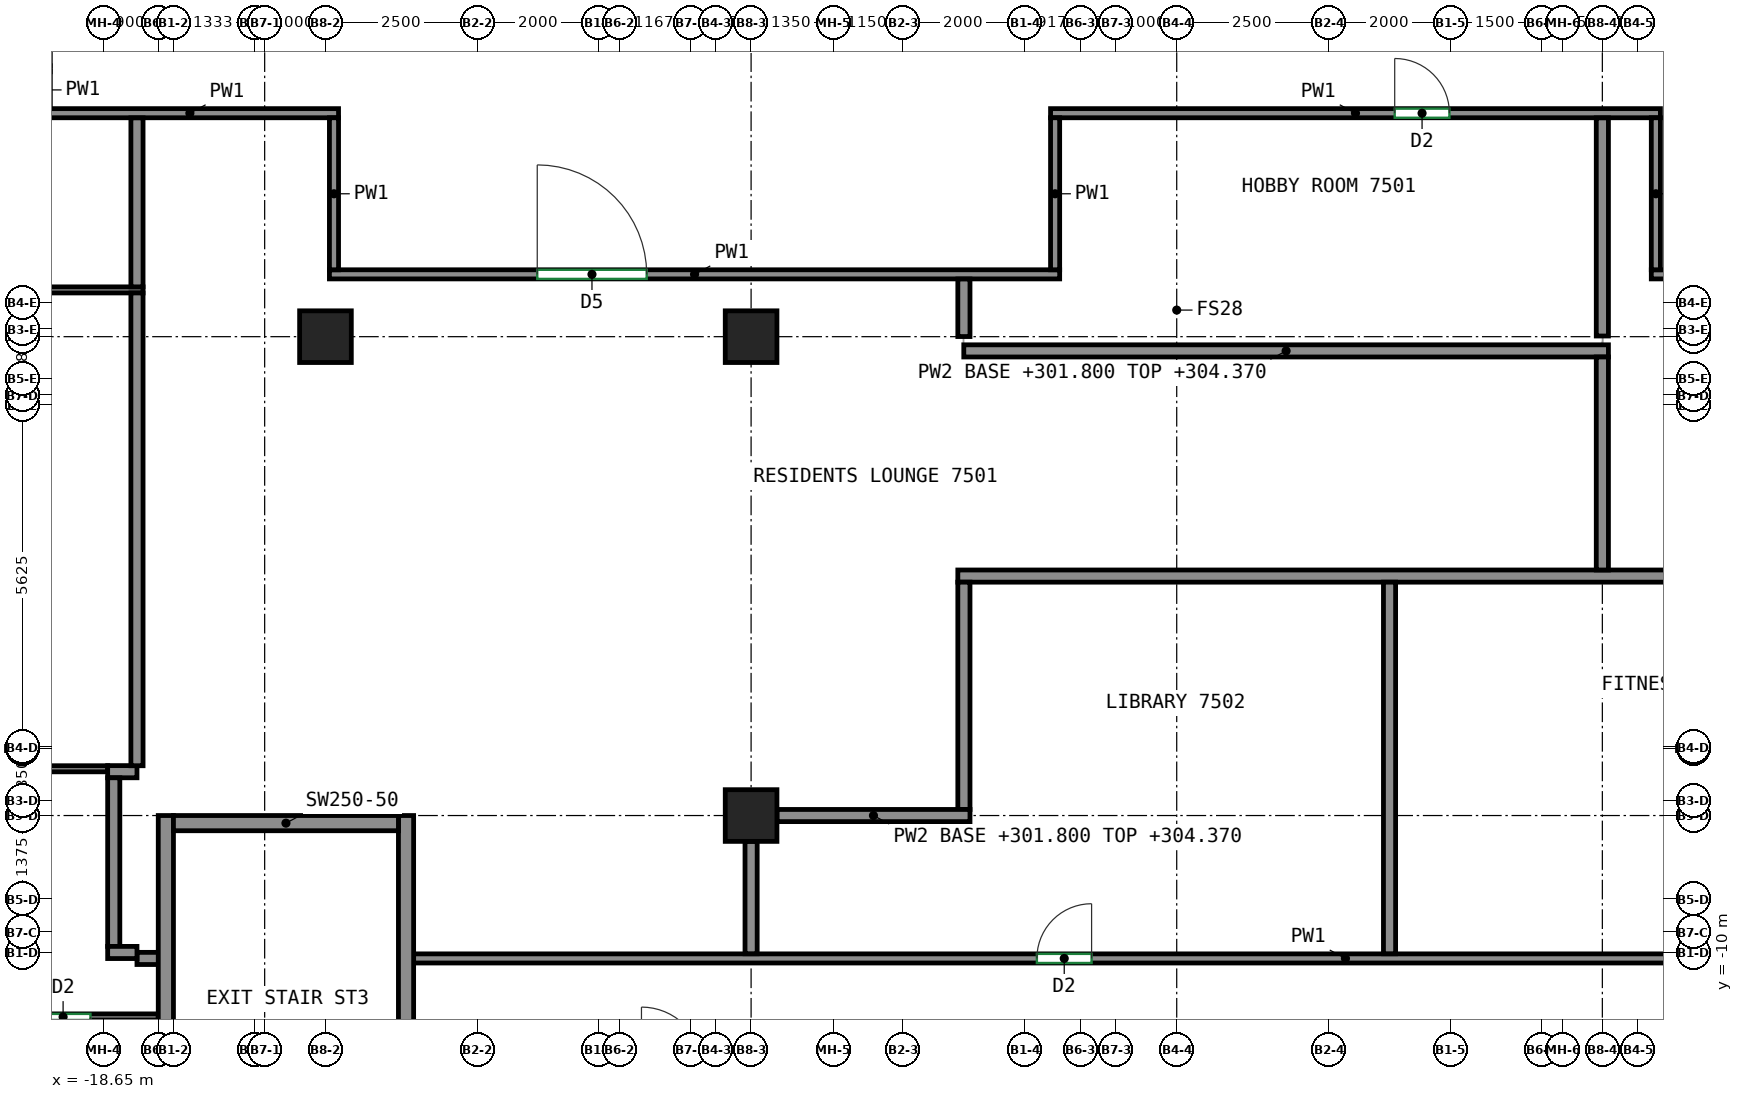
"""IFC4 building model, lengths in metres.
Left out: names, types, materials, properties, quantities, classifications, styles, units other than length and angle.
Written with IfcOpenShell. Run it as: python <this file> out.ifc"""

import sys

from ifc_helpers import new_model, si_unit, direction, frame, frame_2d, origin, origin_2d, place, context, subcontext, project, spatial, rectangle, extrude, source, transform, mapped, element, fill, save


model = new_model("IFC4")
c1 = context("Model", 3, precision=1e-05, world=origin(), true_north=direction((0.0, 1.0)))
c2 = subcontext(c1, "Body", "Model", "MODEL_VIEW")
j1 = project(units=[si_unit("LENGTHUNIT", "METRE"), si_unit("PLANEANGLEUNIT", "RADIAN")], contexts=[c1])
p1 = place(None, origin())
s1 = spatial("IfcSite", under=j1, at=p1, CompositionType="ELEMENT")
p2 = place(p1, origin())
s2 = spatial("IfcBuilding", under=s1, at=p2, CompositionType="ELEMENT")
p3 = place(p2, frame((0.0, 0.0, 301.8)))
s3 = spatial("IfcBuildingStorey", under=s2, at=p3, CompositionType="ELEMENT", Elevation=301.8)
m1 = source(origin(), c2, "Body", "SweptSolid", [
    extrude(rectangle(XDim=0.85, YDim=0.85, at=origin_2d()), origin(), (0.0, 0.0, 1.0), 3.12),
])
for number, where, z_axis, x_axis in (
    (1, (-15.0, 0.125, 0.0), (0.0, 0.0, 1.0), (1.0, 0.0, 0.0)),
    (2, (-8.0, -7.75, 0.0), (0.0, 0.0, 1.0), (1.0, 0.0, 0.0)),
    (3, (-8.0, 0.125, 0.0), (0.0, 0.0, 1.0), (1.0, 0.0, 0.0)),
):
    element("IfcColumn", number, at=place(p3, frame(where, z_axis=z_axis, x_axis=x_axis)), inside=s3, PredefinedType="COLUMN", context=c2, shape_type="MappedRepresentation", body=[
        mapped(m1, transform((0.0, 0.0, 0.0))),
    ])
m2 = source(origin(), c2, "Body", "SweptSolid", [
    extrude(rectangle(XDim=8.0, YDim=0.25, at=frame_2d((4.0, 0.0))), origin(), (0.0, 0.0, 1.0), 3.12),
])
for number, where, z_axis, x_axis in (
    (4, (-17.625, -15.75, 0.0), (0.0, 0.0, 1.0), (0.0, 1.0, 0.0)),
    (5, (-13.675, -15.75, 0.0), (0.0, 0.0, 1.0), (0.0, 1.0, 0.0)),
):
    element("IfcWall", number, at=place(p3, frame(where, z_axis=z_axis, x_axis=x_axis)), inside=s3, PredefinedType="SHEAR", context=c2, shape_type="MappedRepresentation", body=[
        mapped(m2, transform((0.0, 0.0, 0.0))),
    ])
m3 = source(origin(), c2, "Body", "SweptSolid", [
    extrude(rectangle(XDim=3.7, YDim=0.25, at=frame_2d((1.85, 0.0))), origin(), (0.0, 0.0, 1.0), 3.12),
])
p4 = place(p3, frame((-17.5, -7.875, 0.0), z_axis=(0.0, 0.0, 1.0), x_axis=(1.0, 0.0, 0.0)))
e6 = element("IfcWall", 6, at=p4, inside=s3, PredefinedType="SHEAR", context=c2, shape_type="MappedRepresentation", body=[
    mapped(m3, transform((0.0, 0.0, 0.0))),
])
p5 = place(p3, frame((-19.675, 3.8, 0.0), z_axis=(0.0, 0.0, 1.0), x_axis=(1.0, 0.0, 0.0)))
e7 = element("IfcWall", 7, at=p5, inside=s3, PredefinedType="PARTITIONING", context=c2, shape_type="SweptSolid", body=[
    extrude(rectangle(XDim=4.89, YDim=0.15, at=frame_2d((2.445, 0.0))), origin(), (0.0, 0.0, 1.0), 3.12),
])
p6 = place(p3, frame((-14.935, 1.15, 0.0), z_axis=(0.0, 0.0, 1.0), x_axis=(1.0, 0.0, 0.0)))
e8 = element("IfcWall", 8, at=p6, inside=s3, PredefinedType="PARTITIONING", context=c2, shape_type="SweptSolid", body=[
    extrude(rectangle(XDim=12.01, YDim=0.15, at=frame_2d((6.005, 0.0))), origin(), (0.0, 0.0, 1.0), 3.12),
])
p7 = place(p6, frame((3.418, 0.0, 0.0)))
e9 = element("IfcOpeningElement", 9, at=p7, cuts=e8, PredefinedType="OPENING", context=c2, shape_type="SweptSolid", body=[
    extrude(rectangle(XDim=1.8, YDim=2.1, at=frame_2d((0.9, 1.05))), frame((0.0, 0.085, 0.0), z_axis=(0.0, -1.0, 0.0), x_axis=(1.0, 0.0, 0.0)), (0.0, 0.0, 1.0), 0.17),
])
p8 = place(p3, frame((-14.86, 3.725, 0.0), z_axis=(0.0, 0.0, 1.0), x_axis=(0.0, -1.0, 0.0)))
e10 = element("IfcWall", 10, at=p8, inside=s3, PredefinedType="PARTITIONING", context=c2, shape_type="SweptSolid", body=[
    extrude(rectangle(XDim=2.5, YDim=0.15, at=frame_2d((1.25, 0.0))), origin(), (0.0, 0.0, 1.0), 3.12),
])
p9 = place(p3, frame((-13.55, -10.1, 0.0), z_axis=(0.0, 0.0, 1.0), x_axis=(1.0, 0.0, 0.0)))
e11 = element("IfcWall", 11, at=p9, inside=s3, PredefinedType="PARTITIONING", context=c2, shape_type="SweptSolid", body=[
    extrude(rectangle(XDim=30.65, YDim=0.15, at=frame_2d((15.325, 0.0))), origin(), (0.0, 0.0, 1.0), 3.12),
])
p10 = place(p9, frame((10.25, 0.0, 0.0)))
e12 = element("IfcOpeningElement", 12, at=p10, cuts=e11, PredefinedType="OPENING", context=c2, shape_type="SweptSolid", body=[
    extrude(rectangle(XDim=0.9, YDim=2.1, at=frame_2d((0.45, 1.05))), frame((0.0, 0.085, 0.0), z_axis=(0.0, -1.0, 0.0), x_axis=(1.0, 0.0, 0.0)), (0.0, 0.0, 1.0), 0.17),
])
p11 = place(p9, frame((22.153, 0.0, 0.0)))
e13 = element("IfcOpeningElement", 13, at=p11, cuts=e11, PredefinedType="OPENING", context=c2, shape_type="SweptSolid", body=[
    extrude(rectangle(XDim=0.9, YDim=2.1, at=frame_2d((0.45, 1.05))), frame((0.0, 0.085, 0.0), z_axis=(0.0, -1.0, 0.0), x_axis=(1.0, 0.0, 0.0)), (0.0, 0.0, 1.0), 0.17),
])
p12 = place(p3, frame((-3.075, 3.8, 0.0), z_axis=(0.0, 0.0, 1.0), x_axis=(1.0, 0.0, 0.0)))
e14 = element("IfcWall", 14, at=p12, inside=s3, PredefinedType="PARTITIONING", context=c2, shape_type="SweptSolid", body=[
    extrude(rectangle(XDim=10.03, YDim=0.15, at=frame_2d((5.015, 0.0))), origin(), (0.0, 0.0, 1.0), 3.12),
])
p13 = place(p12, frame((5.66, 0.0, 0.0)))
e15 = element("IfcOpeningElement", 15, at=p13, cuts=e14, PredefinedType="OPENING", context=c2, shape_type="SweptSolid", body=[
    extrude(rectangle(XDim=0.9, YDim=2.1, at=frame_2d((0.45, 1.05))), frame((0.0, 0.085, 0.0), z_axis=(0.0, -1.0, 0.0), x_axis=(1.0, 0.0, 0.0)), (0.0, 0.0, 1.0), 0.17),
])
p14 = place(p3, frame((-3.0, 1.225, 0.0), z_axis=(0.0, 0.0, 1.0), x_axis=(0.0, 1.0, 0.0)))
e16 = element("IfcWall", 16, at=p14, inside=s3, PredefinedType="PARTITIONING", context=c2, shape_type="SweptSolid", body=[
    extrude(rectangle(XDim=2.5, YDim=0.15, at=frame_2d((1.25, 0.0))), origin(), (0.0, 0.0, 1.0), 3.12),
])
p15 = place(p3, frame((6.805, 1.15, 0.0), z_axis=(0.0, 0.0, 1.0), x_axis=(1.0, 0.0, 0.0)))
e17 = element("IfcWall", 17, at=p15, inside=s3, PredefinedType="PARTITIONING", context=c2, shape_type="SweptSolid", body=[
    extrude(rectangle(XDim=9.595, YDim=0.15, at=frame_2d((4.797, 0.0))), origin(), (0.0, 0.0, 1.0), 3.12),
])
p16 = place(p15, frame((4.828, 0.0, 0.0)))
e18 = element("IfcOpeningElement", 18, at=p16, cuts=e17, PredefinedType="OPENING", context=c2, shape_type="SweptSolid", body=[
    extrude(rectangle(XDim=0.9, YDim=2.1, at=frame_2d((0.45, 1.05))), frame((0.0, 0.085, 0.0), z_axis=(0.0, -1.0, 0.0), x_axis=(1.0, 0.0, 0.0)), (0.0, 0.0, 1.0), 0.17),
])
p17 = place(p3, frame((6.88, 3.725, 0.0), z_axis=(0.0, 0.0, 1.0), x_axis=(0.0, -1.0, 0.0)))
e19 = element("IfcWall", 19, at=p17, inside=s3, PredefinedType="PARTITIONING", context=c2, shape_type="SweptSolid", body=[
    extrude(rectangle(XDim=2.5, YDim=0.15, at=frame_2d((1.25, 0.0))), origin(), (0.0, 0.0, 1.0), 3.12),
])
p18 = place(p3, frame((-17.75, -11.062, 0.0), z_axis=(0.0, 0.0, 1.0), x_axis=(-1.0, 0.0, 0.0)))
e20 = element("IfcWall", 20, at=p18, inside=s3, PredefinedType="PARTITIONING", context=c2, shape_type="SweptSolid", body=[
    extrude(rectangle(XDim=7.5, YDim=0.1, at=frame_2d((3.75, 0.0))), origin(), (0.0, 0.0, 1.0), 3.12),
])
p19 = place(p18, frame((1.115, 0.0, 0.0)))
e21 = element("IfcOpeningElement", 21, at=p19, cuts=e20, PredefinedType="OPENING", context=c2, shape_type="SweptSolid", body=[
    extrude(rectangle(XDim=0.9, YDim=2.1, at=frame_2d((0.45, 1.05))), frame((0.0, 0.06, 0.0), z_axis=(0.0, -1.0, 0.0), x_axis=(1.0, 0.0, 0.0)), (0.0, 0.0, 1.0), 0.12),
])
p20 = place(p3, frame((-18.582, -6.981, 0.0), z_axis=(0.0, 0.0, 1.0), x_axis=(-1.0, 0.0, 0.0)))
e22 = element("IfcWall", 22, at=p20, inside=s3, PredefinedType="PARTITIONING", context=c2, shape_type="SweptSolid", body=[
    extrude(rectangle(XDim=6.668, YDim=0.1, at=frame_2d((3.334, 0.0))), origin(), (0.0, 0.0, 1.0), 3.12),
])
p21 = place(p20, frame((3.249, 0.0, 0.0)))
e23 = element("IfcOpeningElement", 23, at=p21, cuts=e22, PredefinedType="OPENING", context=c2, shape_type="SweptSolid", body=[
    extrude(rectangle(XDim=0.9, YDim=2.1, at=frame_2d((0.45, 1.05))), frame((0.0, 0.06, 0.0), z_axis=(0.0, -1.0, 0.0), x_axis=(1.0, 0.0, 0.0)), (0.0, 0.0, 1.0), 0.12),
])
p22 = place(p3, frame((-17.7, -10.1, 0.0), z_axis=(0.0, 0.0, 1.0), x_axis=(-1.0, 0.0, 0.0)))
e24 = element("IfcWall", 24, at=p22, inside=s3, PredefinedType="PARTITIONING", context=c2, shape_type="SweptSolid", body=[
    extrude(rectangle(XDim=0.4, YDim=0.2, at=frame_2d((0.2, 0.0))), origin(), (0.0, 0.0, 1.0), 3.12),
])
p23 = place(p3, frame((-18.582, -7.029, 0.0), z_axis=(0.0, 0.0, 1.0), x_axis=(1.0, 0.0, 0.0)))
e25 = element("IfcWall", 25, at=p23, inside=s3, PredefinedType="PARTITIONING", context=c2, shape_type="SweptSolid", body=[
    extrude(rectangle(XDim=0.482, YDim=0.2, at=frame_2d((0.241, 0.0))), origin(), (0.0, 0.0, 1.0), 3.12),
])
p24 = place(p3, frame((-18.482, -9.902, 0.0), z_axis=(0.0, 0.0, 1.0), x_axis=(0.0, 1.0, 0.0)))
e26 = element("IfcWall", 26, at=p24, inside=s3, PredefinedType="PARTITIONING", context=c2, shape_type="SweptSolid", body=[
    extrude(rectangle(XDim=2.773, YDim=0.2, at=frame_2d((1.387, 0.0))), origin(), (0.0, 0.0, 1.0), 3.12),
])
p25 = place(p3, frame((-18.1, -10.002, 0.0), z_axis=(0.0, 0.0, 1.0), x_axis=(-1.0, 0.0, 0.0)))
e27 = element("IfcWall", 27, at=p25, inside=s3, PredefinedType="PARTITIONING", context=c2, shape_type="SweptSolid", body=[
    extrude(rectangle(XDim=0.482, YDim=0.2, at=frame_2d((0.241, 0.0))), origin(), (0.0, 0.0, 1.0), 3.12),
])
p26 = place(p3, frame((-18.0, 0.894, 0.0), z_axis=(0.0, 0.0, 1.0), x_axis=(-1.0, 0.0, 0.0)))
e28 = element("IfcWall", 28, at=p26, inside=s3, PredefinedType="PARTITIONING", context=c2, shape_type="SweptSolid", body=[
    extrude(rectangle(XDim=7.25, YDim=0.1, at=frame_2d((3.625, 0.0))), origin(), (0.0, 0.0, 1.0), 3.12),
])
p27 = place(p26, frame((4.335, 0.0, 0.0)))
e29 = element("IfcOpeningElement", 29, at=p27, cuts=e28, PredefinedType="OPENING", context=c2, shape_type="SweptSolid", body=[
    extrude(rectangle(XDim=0.9, YDim=2.1, at=frame_2d((0.45, 1.05))), frame((0.0, 0.06, 0.0), z_axis=(0.0, -1.0, 0.0), x_axis=(1.0, 0.0, 0.0)), (0.0, 0.0, 1.0), 0.12),
])
p28 = place(p3, frame((-18.1, -6.931, 0.0), z_axis=(0.0, 0.0, 1.0), x_axis=(0.0, 1.0, 0.0)))
e30 = element("IfcWall", 30, at=p28, inside=s3, PredefinedType="PARTITIONING", context=c2, shape_type="SweptSolid", body=[
    extrude(rectangle(XDim=7.775, YDim=0.2, at=frame_2d((3.887, 0.0))), origin(), (0.0, 0.0, 1.0), 3.12),
])
p29 = place(p3, frame((-18.1, 0.944, 0.0), z_axis=(0.0, 0.0, 1.0), x_axis=(0.0, 1.0, 0.0)))
e31 = element("IfcWall", 31, at=p29, inside=s3, PredefinedType="PARTITIONING", context=c2, shape_type="SweptSolid", body=[
    extrude(rectangle(XDim=2.779, YDim=0.2, at=frame_2d((1.389, 0.0))), origin(), (0.0, 0.0, 1.0), 3.12),
])
p30 = place(p3, frame((-4.6, -3.812, 0.0), z_axis=(0.0, 0.0, 1.0), x_axis=(1.0, 0.0, 0.0)))
e32 = element("IfcWall", 32, at=p30, inside=s3, PredefinedType="PARTITIONING", context=c2, shape_type="SweptSolid", body=[
    extrude(rectangle(XDim=17.7, YDim=0.2, at=frame_2d((8.85, 0.0))), origin(), (0.0, 0.0, 1.0), 3.12),
])
p31 = place(p3, frame((-4.5, -7.65, 0.0), z_axis=(0.0, 0.0, 1.0), x_axis=(0.0, 1.0, 0.0)))
e33 = element("IfcWall", 33, at=p31, inside=s3, PredefinedType="PARTITIONING", context=c2, shape_type="SweptSolid", body=[
    extrude(rectangle(XDim=3.738, YDim=0.2, at=frame_2d((1.869, 0.0))), origin(), (0.0, 0.0, 1.0), 3.12),
])
p32 = place(p3, frame((-7.575, -7.75, 0.0), z_axis=(0.0, 0.0, 1.0), x_axis=(1.0, 0.0, 0.0)))
e34 = element("IfcWall", 34, at=p32, inside=s3, PredefinedType="PARTITIONING", context=c2, shape_type="SweptSolid", body=[
    extrude(rectangle(XDim=3.175, YDim=0.2, at=frame_2d((1.587, 0.0))), origin(), (0.0, 0.0, 1.0), 2.57),
])
p33 = place(p3, frame((-8.0, -10.023, 0.0), z_axis=(0.0, 0.0, 1.0), x_axis=(0.0, 1.0, 0.0)))
e35 = element("IfcWall", 35, at=p33, inside=s3, PredefinedType="PARTITIONING", context=c2, shape_type="SweptSolid", body=[
    extrude(rectangle(XDim=1.848, YDim=0.2, at=frame_2d((0.924, 0.0))), origin(), (0.0, 0.0, 1.0), 3.12),
])
p34 = place(p3, frame((-4.5, 0.127, 0.0), z_axis=(0.0, 0.0, 1.0), x_axis=(0.0, 1.0, 0.0)))
e36 = element("IfcWall", 36, at=p34, inside=s3, PredefinedType="PARTITIONING", context=c2, shape_type="SweptSolid", body=[
    extrude(rectangle(XDim=0.946, YDim=0.2, at=frame_2d((0.473, 0.0))), origin(), (0.0, 0.0, 1.0), 3.12),
])
p35 = place(p3, frame((6.1, -0.109, 0.0), z_axis=(0.0, 0.0, 1.0), x_axis=(-1.0, 0.0, 0.0)))
e37 = element("IfcWall", 37, at=p35, inside=s3, PredefinedType="PARTITIONING", context=c2, shape_type="SweptSolid", body=[
    extrude(rectangle(XDim=10.602, YDim=0.2, at=frame_2d((5.301, 0.0))), origin(), (0.0, 0.0, 1.0), 2.57),
])
p36 = place(p3, frame((6.0, -3.712, 0.0), z_axis=(0.0, 0.0, 1.0), x_axis=(0.0, 1.0, 0.0)))
e38 = element("IfcWall", 38, at=p36, inside=s3, PredefinedType="PARTITIONING", context=c2, shape_type="SweptSolid", body=[
    extrude(rectangle(XDim=3.503, YDim=0.2, at=frame_2d((1.751, 0.0))), origin(), (0.0, 0.0, 1.0), 3.12),
])
p37 = place(p3, frame((2.5, -10.023, 0.0), z_axis=(0.0, 0.0, 1.0), x_axis=(0.0, 1.0, 0.0)))
e39 = element("IfcWall", 39, at=p37, inside=s3, PredefinedType="PARTITIONING", context=c2, shape_type="SweptSolid", body=[
    extrude(rectangle(XDim=6.111, YDim=0.2, at=frame_2d((3.055, 0.0))), origin(), (0.0, 0.0, 1.0), 3.12),
])
p38 = place(p3, frame((6.0, 0.136, 0.0), z_axis=(0.0, 0.0, 1.0), x_axis=(0.0, 1.0, 0.0)))
e40 = element("IfcWall", 40, at=p38, inside=s3, PredefinedType="PARTITIONING", context=c2, shape_type="SweptSolid", body=[
    extrude(rectangle(XDim=3.587, YDim=0.2, at=frame_2d((1.793, 0.0))), origin(), (0.0, 0.0, 1.0), 3.12),
])
p39 = place(p19, origin())
e41 = element("IfcDoor", 41, at=p39, inside=s3, OperationType="SINGLE_SWING_LEFT", PredefinedType="DOOR", context=c2, shape_type="SweptSolid", body=[
    extrude(rectangle(XDim=0.9, YDim=2.1, at=frame_2d((0.45, 1.05))), frame((0.0, 0.025, 0.0), z_axis=(0.0, -1.0, 0.0), x_axis=(1.0, 0.0, 0.0)), (0.0, 0.0, 1.0), 0.05),
])
fill(e21, e41)
p40 = place(p10, origin())
e42 = element("IfcDoor", 42, at=p40, inside=s3, OperationType="SINGLE_SWING_RIGHT", PredefinedType="DOOR", context=c2, shape_type="SweptSolid", body=[
    extrude(rectangle(XDim=0.9, YDim=2.1, at=frame_2d((0.45, 1.05))), frame((0.0, 0.025, 0.0), z_axis=(0.0, -1.0, 0.0), x_axis=(1.0, 0.0, 0.0)), (0.0, 0.0, 1.0), 0.05),
])
fill(e12, e42)
p41 = place(p7, origin())
e43 = element("IfcDoor", 43, at=p41, inside=s3, OperationType="DOUBLE_DOOR_SINGLE_SWING", PredefinedType="DOOR", context=c2, shape_type="SweptSolid", body=[
    extrude(rectangle(XDim=1.8, YDim=2.1, at=frame_2d((0.9, 1.05))), frame((0.0, 0.025, 0.0), z_axis=(0.0, -1.0, 0.0), x_axis=(1.0, 0.0, 0.0)), (0.0, 0.0, 1.0), 0.05),
])
fill(e9, e43)
p42 = place(p13, origin())
e44 = element("IfcDoor", 44, at=p42, inside=s3, OperationType="SINGLE_SWING_LEFT", PredefinedType="DOOR", context=c2, shape_type="SweptSolid", body=[
    extrude(rectangle(XDim=0.9, YDim=2.1, at=frame_2d((0.45, 1.05))), frame((0.0, 0.025, 0.0), z_axis=(0.0, -1.0, 0.0), x_axis=(1.0, 0.0, 0.0)), (0.0, 0.0, 1.0), 0.05),
])
fill(e15, e44)
save(model, sys.argv[1])
